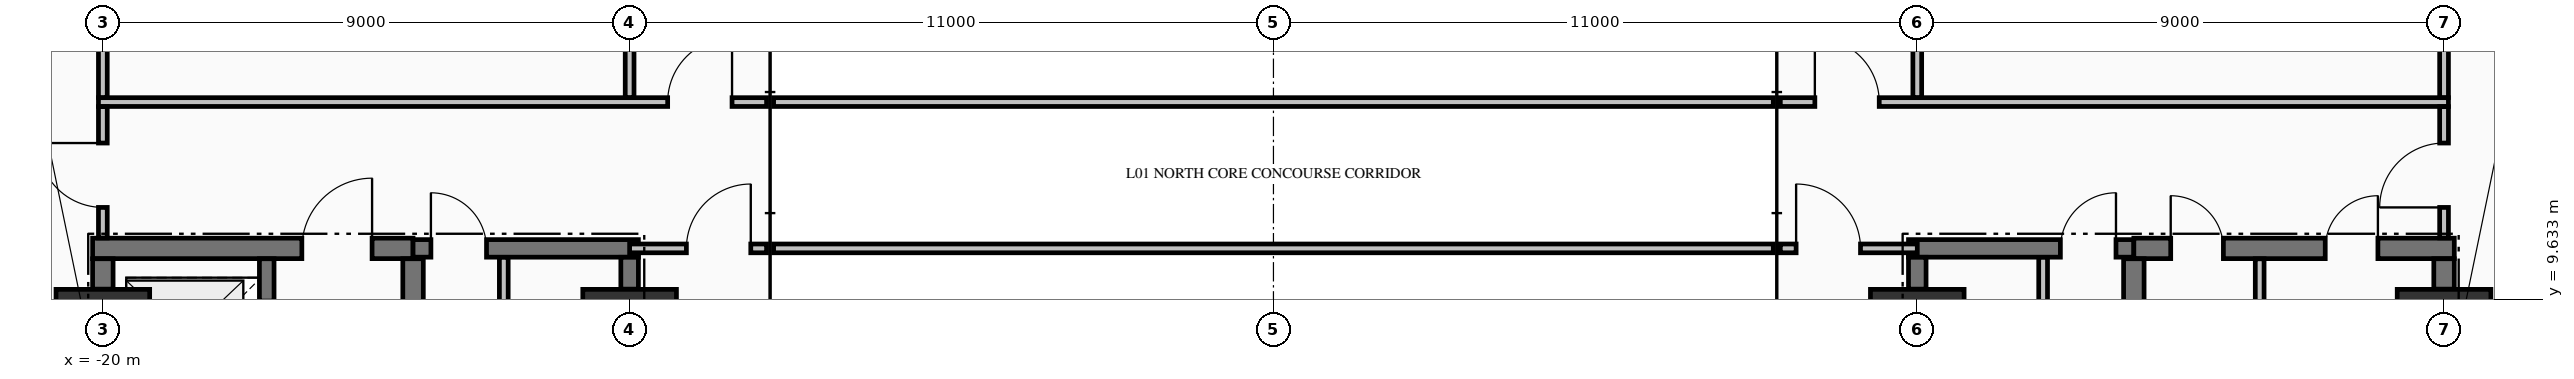
"""IFC4 building model, lengths in metres.
Left out: names, types, materials, properties, quantities, classifications, styles, units other than length and angle.
Written with IfcOpenShell. Run it as: python <this file> out.ifc"""

import sys

from ifc_helpers import new_model, si_unit, direction, frame, frame_2d, origin, origin_2d, place, context, subcontext, project, spatial, rectangle, extrude, element, fill, save


model = new_model("IFC4")
c1 = context("Model", 3, precision=1e-05, world=origin(), true_north=direction((0.0, 1.0)))
c2 = subcontext(c1, "Body", "Model", "MODEL_VIEW")
j1 = project(units=[si_unit("LENGTHUNIT", "METRE"), si_unit("PLANEANGLEUNIT", "RADIAN")], contexts=[c1])
p1 = place(None, origin())
s1 = spatial("IfcSite", under=j1, at=p1, CompositionType="ELEMENT")
p2 = place(p1, origin())
s2 = spatial("IfcBuilding", under=s1, at=p2, CompositionType="ELEMENT")
p3 = place(p2, frame((0.0, 0.0, 5.44)))
s3 = spatial("IfcBuildingStorey", under=s2, at=p3, CompositionType="ELEMENT", Elevation=5.44)
for number, where, z_axis, x_axis in (
    (1, (-20.0, 9.0, 0.0), (0.0, 0.0, 1.0), (1.0, 0.0, 0.0)),
    (2, (-11.0, 9.0, 0.0), (0.0, 0.0, 1.0), (1.0, 0.0, 0.0)),
    (3, (11.0, 9.0, 0.0), (0.0, 0.0, 1.0), (1.0, 0.0, 0.0)),
    (4, (20.0, 9.0, 0.0), (0.0, 0.0, 1.0), (1.0, 0.0, 0.0)),
):
    element("IfcColumn", number, at=place(p3, frame(where, z_axis=z_axis, x_axis=x_axis)), inside=s3, PredefinedType="COLUMN", context=c2, shape_type="SweptSolid", body=[
        extrude(rectangle(XDim=1.6, YDim=1.6, at=origin_2d()), origin(), (0.0, 0.0, 1.0), 5.09),
    ])
p4 = place(p3, frame((-20.175, 10.5, 0.0), z_axis=(0.0, 0.0, 1.0), x_axis=(1.0, 0.0, 0.0)))
e5 = element("IfcWall", 5, at=p4, inside=s3, PredefinedType="SHEAR", context=c2, shape_type="SweptSolid", body=[
    extrude(rectangle(XDim=5.475, YDim=0.35, at=frame_2d((2.738, 0.0))), origin(), (0.0, 0.0, 1.0), 5.09),
])
p5 = place(p4, frame((3.575, 0.0, 0.0)))
e6 = element("IfcOpeningElement", 6, at=p5, cuts=e5, PredefinedType="OPENING", context=c2, shape_type="SweptSolid", body=[
    extrude(rectangle(XDim=1.2, YDim=2.15, at=frame_2d((0.6, 1.075))), frame((0.0, 0.185, 0.0), z_axis=(0.0, -1.0, 0.0), x_axis=(1.0, 0.0, 0.0)), (0.0, 0.0, 1.0), 0.37),
])
p6 = place(p3, frame((-14.7, 10.5, 0.0), z_axis=(0.0, 0.0, 1.0), x_axis=(1.0, 0.0, 0.0)))
e7 = element("IfcWall", 7, at=p6, inside=s3, PredefinedType="SHEAR", context=c2, shape_type="SweptSolid", body=[
    extrude(rectangle(XDim=3.85, YDim=0.3, at=frame_2d((1.925, 0.0))), origin(), (0.0, 0.0, 1.0), 5.09),
])
p7 = place(p6, frame((0.305, 0.0, 0.0)))
e8 = element("IfcOpeningElement", 8, at=p7, cuts=e7, PredefinedType="OPENING", context=c2, shape_type="SweptSolid", body=[
    extrude(rectangle(XDim=0.95, YDim=2.15, at=frame_2d((0.475, 1.075))), frame((0.0, 0.16, 0.0), z_axis=(0.0, -1.0, 0.0), x_axis=(1.0, 0.0, 0.0)), (0.0, 0.0, 1.0), 0.32),
])
p8 = place(p3, frame((10.85, 10.5, 0.0), z_axis=(0.0, 0.0, 1.0), x_axis=(1.0, 0.0, 0.0)))
e9 = element("IfcWall", 9, at=p8, inside=s3, PredefinedType="SHEAR", context=c2, shape_type="SweptSolid", body=[
    extrude(rectangle(XDim=3.85, YDim=0.3, at=frame_2d((1.925, 0.0))), origin(), (0.0, 0.0, 1.0), 5.09),
])
p9 = place(p8, frame((2.595, 0.0, 0.0)))
e10 = element("IfcOpeningElement", 10, at=p9, cuts=e9, PredefinedType="OPENING", context=c2, shape_type="SweptSolid", body=[
    extrude(rectangle(XDim=0.95, YDim=2.15, at=frame_2d((0.475, 1.075))), frame((0.0, 0.16, 0.0), z_axis=(0.0, -1.0, 0.0), x_axis=(1.0, 0.0, 0.0)), (0.0, 0.0, 1.0), 0.32),
])
p10 = place(p3, frame((14.7, 10.5, 0.0), z_axis=(0.0, 0.0, 1.0), x_axis=(1.0, 0.0, 0.0)))
e11 = element("IfcWall", 11, at=p10, inside=s3, PredefinedType="SHEAR", context=c2, shape_type="SweptSolid", body=[
    extrude(rectangle(XDim=5.475, YDim=0.35, at=frame_2d((2.738, 0.0))), origin(), (0.0, 0.0, 1.0), 5.09),
])
p11 = place(p10, frame((0.63, 0.0, 0.0)))
e12 = element("IfcOpeningElement", 12, at=p11, cuts=e11, PredefinedType="OPENING", context=c2, shape_type="SweptSolid", body=[
    extrude(rectangle(XDim=0.9, YDim=2.15, at=frame_2d((0.45, 1.075))), frame((0.0, 0.185, 0.0), z_axis=(0.0, -1.0, 0.0), x_axis=(1.0, 0.0, 0.0)), (0.0, 0.0, 1.0), 0.37),
])
p12 = place(p10, frame((3.27, 0.0, 0.0)))
e13 = element("IfcOpeningElement", 13, at=p12, cuts=e11, PredefinedType="OPENING", context=c2, shape_type="SweptSolid", body=[
    extrude(rectangle(XDim=0.9, YDim=2.15, at=frame_2d((0.45, 1.075))), frame((0.0, 0.185, 0.0), z_axis=(0.0, -1.0, 0.0), x_axis=(1.0, 0.0, 0.0)), (0.0, 0.0, 1.0), 0.37),
])
p13 = place(p3, frame((-11.0, 10.5, 0.0), z_axis=(0.0, 0.0, 1.0), x_axis=(1.0, 0.0, 0.0)))
e14 = element("IfcWall", 14, at=p13, inside=s3, PredefinedType="PARTITIONING", context=c2, shape_type="SweptSolid", body=[
    extrude(rectangle(XDim=2.34, YDim=0.15, at=frame_2d((1.17, 0.0))), origin(), (0.0, 0.0, 1.0), 5.09),
])
p14 = place(p13, frame((0.97, 0.0, 0.0)))
e15 = element("IfcOpeningElement", 15, at=p14, cuts=e14, PredefinedType="OPENING", context=c2, shape_type="SweptSolid", body=[
    extrude(rectangle(XDim=1.1, YDim=2.15, at=frame_2d((0.55, 1.075))), frame((0.0, 0.085, 0.0), z_axis=(0.0, -1.0, 0.0), x_axis=(1.0, 0.0, 0.0)), (0.0, 0.0, 1.0), 0.17),
])
p15 = place(p3, frame((-8.54, 10.5, 0.0), z_axis=(0.0, 0.0, 1.0), x_axis=(1.0, 0.0, 0.0)))
e16 = element("IfcWall", 16, at=p15, inside=s3, PredefinedType="PARTITIONING", context=c2, shape_type="SweptSolid", body=[
    extrude(rectangle(XDim=17.08, YDim=0.15, at=frame_2d((8.54, 0.0))), origin(), (0.0, 0.0, 1.0), 5.09),
])
p16 = place(p3, frame((8.66, 10.5, 0.0), z_axis=(0.0, 0.0, 1.0), x_axis=(1.0, 0.0, 0.0)))
e17 = element("IfcWall", 17, at=p16, inside=s3, PredefinedType="PARTITIONING", context=c2, shape_type="SweptSolid", body=[
    extrude(rectangle(XDim=2.34, YDim=0.15, at=frame_2d((1.17, 0.0))), origin(), (0.0, 0.0, 1.0), 5.09),
])
p17 = place(p16, frame((0.27, 0.0, 0.0)))
e18 = element("IfcOpeningElement", 18, at=p17, cuts=e17, PredefinedType="OPENING", context=c2, shape_type="SweptSolid", body=[
    extrude(rectangle(XDim=1.1, YDim=2.15, at=frame_2d((0.55, 1.075))), frame((0.0, 0.085, 0.0), z_axis=(0.0, -1.0, 0.0), x_axis=(1.0, 0.0, 0.0)), (0.0, 0.0, 1.0), 0.17),
])
p18 = place(p3, frame((-20.075, 13.0, 0.0), z_axis=(0.0, 0.0, 1.0), x_axis=(1.0, 0.0, 0.0)))
e19 = element("IfcWall", 19, at=p18, inside=s3, PredefinedType="PARTITIONING", context=c2, shape_type="SweptSolid", body=[
    extrude(rectangle(XDim=11.415, YDim=0.15, at=frame_2d((5.708, 0.0))), origin(), (0.0, 0.0, 1.0), 5.09),
])
p19 = place(p18, frame((9.725, 0.0, 0.0)))
e20 = element("IfcOpeningElement", 20, at=p19, cuts=e19, PredefinedType="OPENING", context=c2, shape_type="SweptSolid", body=[
    extrude(rectangle(XDim=1.1, YDim=2.15, at=frame_2d((0.55, 1.075))), frame((0.0, 0.085, 0.0), z_axis=(0.0, -1.0, 0.0), x_axis=(1.0, 0.0, 0.0)), (0.0, 0.0, 1.0), 0.17),
])
p20 = place(p3, frame((-8.54, 13.0, 0.0), z_axis=(0.0, 0.0, 1.0), x_axis=(1.0, 0.0, 0.0)))
e21 = element("IfcWall", 21, at=p20, inside=s3, PredefinedType="PARTITIONING", context=c2, shape_type="SweptSolid", body=[
    extrude(rectangle(XDim=17.08, YDim=0.15, at=frame_2d((8.54, 0.0))), origin(), (0.0, 0.0, 1.0), 5.09),
])
p21 = place(p3, frame((8.66, 13.0, 0.0), z_axis=(0.0, 0.0, 1.0), x_axis=(1.0, 0.0, 0.0)))
e22 = element("IfcWall", 22, at=p21, inside=s3, PredefinedType="PARTITIONING", context=c2, shape_type="SweptSolid", body=[
    extrude(rectangle(XDim=11.415, YDim=0.15, at=frame_2d((5.708, 0.0))), origin(), (0.0, 0.0, 1.0), 5.09),
])
p22 = place(p21, frame((0.59, 0.0, 0.0)))
e23 = element("IfcOpeningElement", 23, at=p22, cuts=e22, PredefinedType="OPENING", context=c2, shape_type="SweptSolid", body=[
    extrude(rectangle(XDim=1.1, YDim=2.15, at=frame_2d((0.55, 1.075))), frame((0.0, 0.085, 0.0), z_axis=(0.0, -1.0, 0.0), x_axis=(1.0, 0.0, 0.0)), (0.0, 0.0, 1.0), 0.17),
])
p23 = place(p3, frame((-20.0, 9.804, 0.0), z_axis=(0.0, 0.0, 1.0), x_axis=(0.0, 1.0, 0.0)))
e24 = element("IfcWall", 24, at=p23, inside=s3, PredefinedType="SHEAR", context=c2, shape_type="SweptSolid", body=[
    extrude(rectangle(XDim=0.519, YDim=0.35, at=frame_2d((0.26, 0.0))), origin(), (0.0, 0.0, 1.0), 5.09),
])
p24 = place(p3, frame((-17.2, 7.727, 0.0), z_axis=(0.0, 0.0, 1.0), x_axis=(0.0, 1.0, 0.0)))
e25 = element("IfcWall", 25, at=p24, inside=s3, PredefinedType="SOLIDWALL", context=c2, shape_type="SweptSolid", body=[
    extrude(rectangle(XDim=2.596, YDim=0.25, at=frame_2d((1.298, 0.0))), origin(), (0.0, 0.0, 1.0), 5.09),
])
p25 = place(p24, frame((0.773, 0.0, 0.0)))
e26 = element("IfcOpeningElement", 26, at=p25, cuts=e25, PredefinedType="OPENING", context=c2, shape_type="SweptSolid", body=[
    extrude(rectangle(XDim=1.1, YDim=2.2, at=frame_2d((0.55, 1.1))), frame((0.0, 0.135, 0.0), z_axis=(0.0, -1.0, 0.0), x_axis=(1.0, 0.0, 0.0)), (0.0, 0.0, 1.0), 0.27),
])
p26 = place(p3, frame((-14.7, 5.852, 0.0), z_axis=(0.0, 0.0, 1.0), x_axis=(0.0, 1.0, 0.0)))
e27 = element("IfcWall", 27, at=p26, inside=s3, PredefinedType="SHEAR", context=c2, shape_type="SweptSolid", body=[
    extrude(rectangle(XDim=4.471, YDim=0.35, at=frame_2d((2.235, 0.0))), origin(), (0.0, 0.0, 1.0), 5.09),
])
for number, where, z_axis, x_axis in (
    (28, (-11.0, 9.804, 0.0), (0.0, 0.0, 1.0), (0.0, 1.0, 0.0)),
    (29, (11.0, 9.804, 0.0), (0.0, 0.0, 1.0), (0.0, 1.0, 0.0)),
):
    element("IfcWall", number, at=place(p3, frame(where, z_axis=z_axis, x_axis=x_axis)), inside=s3, PredefinedType="SHEAR", context=c2, shape_type="SweptSolid", body=[
        extrude(rectangle(XDim=0.544, YDim=0.3, at=frame_2d((0.272, 0.0))), origin(), (0.0, 0.0, 1.0), 5.09),
    ])
p27 = place(p3, frame((14.7, 5.852, 0.0), z_axis=(0.0, 0.0, 1.0), x_axis=(0.0, 1.0, 0.0)))
e30 = element("IfcWall", 30, at=p27, inside=s3, PredefinedType="SHEAR", context=c2, shape_type="SweptSolid", body=[
    extrude(rectangle(XDim=4.471, YDim=0.35, at=frame_2d((2.235, 0.0))), origin(), (0.0, 0.0, 1.0), 5.09),
])
p28 = place(p3, frame((20.0, 9.804, 0.0), z_axis=(0.0, 0.0, 1.0), x_axis=(0.0, 1.0, 0.0)))
e31 = element("IfcWall", 31, at=p28, inside=s3, PredefinedType="SHEAR", context=c2, shape_type="SweptSolid", body=[
    extrude(rectangle(XDim=0.519, YDim=0.35, at=frame_2d((0.26, 0.0))), origin(), (0.0, 0.0, 1.0), 5.09),
])
p29 = place(p3, frame((-20.0, 10.678, 0.0), z_axis=(0.0, 0.0, 1.0), x_axis=(0.0, 1.0, 0.0)))
e32 = element("IfcWall", 32, at=p29, inside=s3, PredefinedType="PARTITIONING", context=c2, shape_type="SweptSolid", body=[
    extrude(rectangle(XDim=2.244, YDim=0.15, at=frame_2d((1.122, 0.0))), origin(), (0.0, 0.0, 1.0), 4.132),
])
p30 = place(p29, frame((0.522, 0.0, 0.0)))
e33 = element("IfcOpeningElement", 33, at=p30, cuts=e32, PredefinedType="OPENING", context=c2, shape_type="SweptSolid", body=[
    extrude(rectangle(XDim=1.1, YDim=2.15, at=frame_2d((0.55, 1.075))), frame((0.0, 0.085, 0.0), z_axis=(0.0, -1.0, 0.0), x_axis=(1.0, 0.0, 0.0)), (0.0, 0.0, 1.0), 0.17),
])
p31 = place(p3, frame((-20.0, 13.078, 0.0), z_axis=(0.0, 0.0, 1.0), x_axis=(0.0, 1.0, 0.0)))
e34 = element("IfcWall", 34, at=p31, inside=s3, PredefinedType="PARTITIONING", context=c2, shape_type="SweptSolid", body=[
    extrude(rectangle(XDim=2.116, YDim=0.15, at=frame_2d((1.058, 0.0))), origin(), (0.0, 0.0, 1.0), 4.132),
])
p32 = place(p3, frame((-13.15, 7.228, 0.0), z_axis=(0.0, 0.0, 1.0), x_axis=(0.0, 1.0, 0.0)))
e35 = element("IfcWall", 35, at=p32, inside=s3, PredefinedType="PARTITIONING", context=c2, shape_type="SweptSolid", body=[
    extrude(rectangle(XDim=3.119, YDim=0.15, at=frame_2d((1.56, 0.0))), origin(), (0.0, 0.0, 1.0), 5.09),
])
p33 = place(p32, frame((1.097, 0.0, 0.0)))
e36 = element("IfcOpeningElement", 36, at=p33, cuts=e35, PredefinedType="OPENING", context=c2, shape_type="SweptSolid", body=[
    extrude(rectangle(XDim=0.95, YDim=2.15, at=frame_2d((0.475, 1.075))), frame((0.0, 0.085, 0.0), z_axis=(0.0, -1.0, 0.0), x_axis=(1.0, 0.0, 0.0)), (0.0, 0.0, 1.0), 0.17),
])
for number, where, z_axis, x_axis in (
    (37, (-11.0, 13.078, 0.0), (0.0, 0.0, 1.0), (0.0, 1.0, 0.0)),
    (38, (11.0, 13.078, 0.0), (0.0, 0.0, 1.0), (0.0, 1.0, 0.0)),
):
    element("IfcWall", number, at=place(p3, frame(where, z_axis=z_axis, x_axis=x_axis)), inside=s3, PredefinedType="PARTITIONING", context=c2, shape_type="SweptSolid", body=[
        extrude(rectangle(XDim=2.116, YDim=0.15, at=frame_2d((1.058, 0.0))), origin(), (0.0, 0.0, 1.0), 4.132),
    ])
p34 = place(p3, frame((13.15, 7.228, 0.0), z_axis=(0.0, 0.0, 1.0), x_axis=(0.0, 1.0, 0.0)))
e39 = element("IfcWall", 39, at=p34, inside=s3, PredefinedType="PARTITIONING", context=c2, shape_type="SweptSolid", body=[
    extrude(rectangle(XDim=3.119, YDim=0.15, at=frame_2d((1.56, 0.0))), origin(), (0.0, 0.0, 1.0), 5.09),
])
p35 = place(p34, frame((1.097, 0.0, 0.0)))
e40 = element("IfcOpeningElement", 40, at=p35, cuts=e39, PredefinedType="OPENING", context=c2, shape_type="SweptSolid", body=[
    extrude(rectangle(XDim=0.95, YDim=2.15, at=frame_2d((0.475, 1.075))), frame((0.0, 0.085, 0.0), z_axis=(0.0, -1.0, 0.0), x_axis=(1.0, 0.0, 0.0)), (0.0, 0.0, 1.0), 0.17),
])
p36 = place(p3, frame((16.85, 3.078, 0.0), z_axis=(0.0, 0.0, 1.0), x_axis=(0.0, 1.0, 0.0)))
e41 = element("IfcWall", 41, at=p36, inside=s3, PredefinedType="PARTITIONING", context=c2, shape_type="SweptSolid", body=[
    extrude(rectangle(XDim=7.244, YDim=0.15, at=frame_2d((3.622, 0.0))), origin(), (0.0, 0.0, 1.0), 5.09),
])
p37 = place(p3, frame((20.0, 10.678, 0.0), z_axis=(0.0, 0.0, 1.0), x_axis=(0.0, 1.0, 0.0)))
e42 = element("IfcWall", 42, at=p37, inside=s3, PredefinedType="PARTITIONING", context=c2, shape_type="SweptSolid", body=[
    extrude(rectangle(XDim=2.244, YDim=0.15, at=frame_2d((1.122, 0.0))), origin(), (0.0, 0.0, 1.0), 4.132),
])
p38 = place(p37, frame((0.522, 0.0, 0.0)))
e43 = element("IfcOpeningElement", 43, at=p38, cuts=e42, PredefinedType="OPENING", context=c2, shape_type="SweptSolid", body=[
    extrude(rectangle(XDim=1.1, YDim=2.15, at=frame_2d((0.55, 1.075))), frame((0.0, 0.085, 0.0), z_axis=(0.0, -1.0, 0.0), x_axis=(1.0, 0.0, 0.0)), (0.0, 0.0, 1.0), 0.17),
])
p39 = place(p3, frame((20.0, 13.078, 0.0), z_axis=(0.0, 0.0, 1.0), x_axis=(0.0, 1.0, 0.0)))
e44 = element("IfcWall", 44, at=p39, inside=s3, PredefinedType="PARTITIONING", context=c2, shape_type="SweptSolid", body=[
    extrude(rectangle(XDim=2.116, YDim=0.15, at=frame_2d((1.058, 0.0))), origin(), (0.0, 0.0, 1.0), 4.132),
])
p40 = place(p7, origin())
e45 = element("IfcDoor", 45, at=p40, inside=s3, OperationType="SINGLE_SWING_LEFT", PredefinedType="DOOR", context=c2, shape_type="SweptSolid", body=[
    extrude(rectangle(XDim=0.95, YDim=2.15, at=frame_2d((0.475, 1.075))), frame((0.0, 0.025, 0.0), z_axis=(0.0, -1.0, 0.0), x_axis=(1.0, 0.0, 0.0)), (0.0, 0.0, 1.0), 0.05),
])
fill(e8, e45)
p41 = place(p9, origin())
e46 = element("IfcDoor", 46, at=p41, inside=s3, OperationType="SINGLE_SWING_RIGHT", PredefinedType="DOOR", context=c2, shape_type="SweptSolid", body=[
    extrude(rectangle(XDim=0.95, YDim=2.15, at=frame_2d((0.475, 1.075))), frame((0.0, 0.025, 0.0), z_axis=(0.0, -1.0, 0.0), x_axis=(1.0, 0.0, 0.0)), (0.0, 0.0, 1.0), 0.05),
])
fill(e10, e46)
p42 = place(p5, origin())
e47 = element("IfcDoor", 47, at=p42, inside=s3, OperationType="SINGLE_SWING_RIGHT", PredefinedType="DOOR", context=c2, shape_type="SweptSolid", body=[
    extrude(rectangle(XDim=1.2, YDim=2.15, at=frame_2d((0.6, 1.075))), frame((0.0, 0.025, 0.0), z_axis=(0.0, -1.0, 0.0), x_axis=(1.0, 0.0, 0.0)), (0.0, 0.0, 1.0), 0.05),
])
fill(e6, e47)
p43 = place(p11, origin())
e48 = element("IfcDoor", 48, at=p43, inside=s3, OperationType="SINGLE_SWING_LEFT", PredefinedType="DOOR", context=c2, shape_type="SweptSolid", body=[
    extrude(rectangle(XDim=0.9, YDim=2.15, at=frame_2d((0.45, 1.075))), frame((0.0, 0.025, 0.0), z_axis=(0.0, -1.0, 0.0), x_axis=(1.0, 0.0, 0.0)), (0.0, 0.0, 1.0), 0.05),
])
fill(e12, e48)
p44 = place(p12, origin())
e49 = element("IfcDoor", 49, at=p44, inside=s3, OperationType="SINGLE_SWING_RIGHT", PredefinedType="DOOR", context=c2, shape_type="SweptSolid", body=[
    extrude(rectangle(XDim=0.9, YDim=2.15, at=frame_2d((0.45, 1.075))), frame((0.0, 0.025, 0.0), z_axis=(0.0, -1.0, 0.0), x_axis=(1.0, 0.0, 0.0)), (0.0, 0.0, 1.0), 0.05),
])
fill(e13, e49)
p45 = place(p19, origin())
e50 = element("IfcDoor", 50, at=p45, inside=s3, OperationType="SINGLE_SWING_RIGHT", PredefinedType="DOOR", context=c2, shape_type="SweptSolid", body=[
    extrude(rectangle(XDim=1.1, YDim=2.15, at=frame_2d((0.55, 1.075))), frame((0.0, 0.025, 0.0), z_axis=(0.0, -1.0, 0.0), x_axis=(1.0, 0.0, 0.0)), (0.0, 0.0, 1.0), 0.05),
])
fill(e20, e50)
p46 = place(p22, origin())
e51 = element("IfcDoor", 51, at=p46, inside=s3, OperationType="SINGLE_SWING_LEFT", PredefinedType="DOOR", context=c2, shape_type="SweptSolid", body=[
    extrude(rectangle(XDim=1.1, YDim=2.15, at=frame_2d((0.55, 1.075))), frame((0.0, 0.025, 0.0), z_axis=(0.0, -1.0, 0.0), x_axis=(1.0, 0.0, 0.0)), (0.0, 0.0, 1.0), 0.05),
])
fill(e23, e51)
p47 = place(p14, origin())
e52 = element("IfcDoor", 52, at=p47, inside=s3, OperationType="SINGLE_SWING_RIGHT", PredefinedType="DOOR", context=c2, shape_type="SweptSolid", body=[
    extrude(rectangle(XDim=1.1, YDim=2.15, at=frame_2d((0.55, 1.075))), frame((0.0, 0.025, 0.0), z_axis=(0.0, -1.0, 0.0), x_axis=(1.0, 0.0, 0.0)), (0.0, 0.0, 1.0), 0.05),
])
fill(e15, e52)
p48 = place(p17, origin())
e53 = element("IfcDoor", 53, at=p48, inside=s3, OperationType="SINGLE_SWING_LEFT", PredefinedType="DOOR", context=c2, shape_type="SweptSolid", body=[
    extrude(rectangle(XDim=1.1, YDim=2.15, at=frame_2d((0.55, 1.075))), frame((0.0, 0.025, 0.0), z_axis=(0.0, -1.0, 0.0), x_axis=(1.0, 0.0, 0.0)), (0.0, 0.0, 1.0), 0.05),
])
fill(e18, e53)
p49 = place(p30, origin())
e54 = element("IfcDoor", 54, at=p49, inside=s3, OperationType="SINGLE_SWING_RIGHT", PredefinedType="DOOR", context=c2, shape_type="SweptSolid", body=[
    extrude(rectangle(XDim=1.1, YDim=2.15, at=frame_2d((0.55, 1.075))), frame((0.0, 0.025, 0.0), z_axis=(0.0, -1.0, 0.0), x_axis=(1.0, 0.0, 0.0)), (0.0, 0.0, 1.0), 0.05),
])
fill(e33, e54)
p50 = place(p38, origin())
e55 = element("IfcDoor", 55, at=p50, inside=s3, OperationType="SINGLE_SWING_LEFT", PredefinedType="DOOR", context=c2, shape_type="SweptSolid", body=[
    extrude(rectangle(XDim=1.1, YDim=2.15, at=frame_2d((0.55, 1.075))), frame((0.0, 0.025, 0.0), z_axis=(0.0, -1.0, 0.0), x_axis=(1.0, 0.0, 0.0)), (0.0, 0.0, 1.0), 0.05),
])
fill(e43, e55)
save(model, sys.argv[1])
